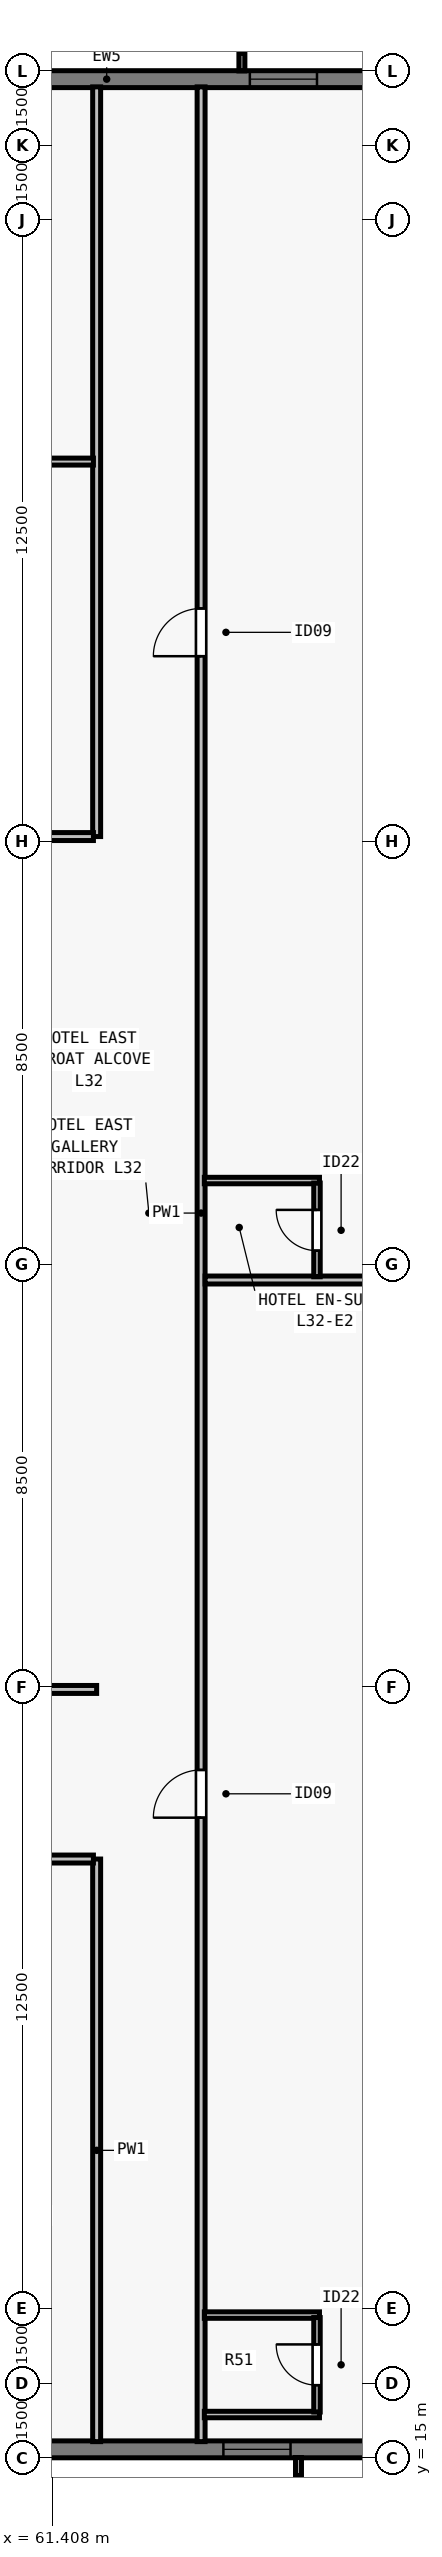
"""IFC4 building model, lengths in metres.
Left out: names, types, materials, properties, quantities, classifications, styles, units other than length and angle.
Written with IfcOpenShell. Run it as: python <this file> out.ifc"""

import sys

from ifc_helpers import new_model, si_unit, direction, frame, frame_2d, origin, place, context, subcontext, project, spatial, rectangle, extrude, element, fill, save


model = new_model("IFC4")
c1 = context("Model", 3, precision=1e-05, world=origin(), true_north=direction((0.0, 1.0)))
c2 = subcontext(c1, "Body", "Model", "MODEL_VIEW")
j1 = project(units=[si_unit("LENGTHUNIT", "METRE"), si_unit("PLANEANGLEUNIT", "RADIAN")], contexts=[c1])
p1 = place(None, origin())
s1 = spatial("IfcSite", under=j1, at=p1, CompositionType="ELEMENT")
p2 = place(p1, origin())
s2 = spatial("IfcBuilding", under=s1, at=p2, CompositionType="ELEMENT")
p3 = place(p2, frame((0.0, 0.0, 120.0)))
s3 = spatial("IfcBuildingStorey", under=s2, at=p3, CompositionType="ELEMENT", Elevation=120.0)
p4 = place(p3, frame((32.0, 62.83, 0.0), z_axis=(0.0, 0.0, 1.0), x_axis=(1.0, 0.0, 0.0)))
e1 = element("IfcWall", 1, at=p4, inside=s3, PredefinedType="SOLIDWALL", context=c2, shape_type="SweptSolid", body=[
    extrude(rectangle(XDim=39.682, YDim=0.34, at=frame_2d((19.841, 0.0))), origin(), (0.0, 0.0, 1.0), 3.28),
])
p5 = place(p4, frame((4.102, 0.0, 0.8)))
e2 = element("IfcOpeningElement", 2, at=p5, cuts=e1, PredefinedType="OPENING", context=c2, shape_type="SweptSolid", body=[
    extrude(rectangle(XDim=1.35, YDim=1.66, at=frame_2d((0.675, 0.83))), frame((0.0, 0.18, 0.0), z_axis=(0.0, -1.0, 0.0), x_axis=(1.0, 0.0, 0.0)), (0.0, 0.0, 1.0), 0.36),
])
p6 = place(p4, frame((8.755, 0.0, 0.8)))
e3 = element("IfcOpeningElement", 3, at=p6, cuts=e1, PredefinedType="OPENING", context=c2, shape_type="SweptSolid", body=[
    extrude(rectangle(XDim=1.75, YDim=1.66, at=frame_2d((0.875, 0.83))), frame((0.0, 0.18, 0.0), z_axis=(0.0, -1.0, 0.0), x_axis=(1.0, 0.0, 0.0)), (0.0, 0.0, 1.0), 0.36),
])
p7 = place(p4, frame((12.059, 0.0, 0.8)))
e4 = element("IfcOpeningElement", 4, at=p7, cuts=e1, PredefinedType="OPENING", context=c2, shape_type="SweptSolid", body=[
    extrude(rectangle(XDim=1.35, YDim=1.66, at=frame_2d((0.675, 0.83))), frame((0.0, 0.18, 0.0), z_axis=(0.0, -1.0, 0.0), x_axis=(1.0, 0.0, 0.0)), (0.0, 0.0, 1.0), 0.36),
])
p8 = place(p4, frame((16.262, 0.0, 0.8)))
e5 = element("IfcOpeningElement", 5, at=p8, cuts=e1, PredefinedType="OPENING", context=c2, shape_type="SweptSolid", body=[
    extrude(rectangle(XDim=1.75, YDim=1.66, at=frame_2d((0.875, 0.83))), frame((0.0, 0.18, 0.0), z_axis=(0.0, -1.0, 0.0), x_axis=(1.0, 0.0, 0.0)), (0.0, 0.0, 1.0), 0.36),
])
p9 = place(p4, frame((18.316, 0.0, 0.8)))
e6 = element("IfcOpeningElement", 6, at=p9, cuts=e1, PredefinedType="OPENING", context=c2, shape_type="SweptSolid", body=[
    extrude(rectangle(XDim=1.35, YDim=1.66, at=frame_2d((0.675, 0.83))), frame((0.0, 0.18, 0.0), z_axis=(0.0, -1.0, 0.0), x_axis=(1.0, 0.0, 0.0)), (0.0, 0.0, 1.0), 0.36),
])
p10 = place(p4, frame((22.07, 0.0, 0.8)))
e7 = element("IfcOpeningElement", 7, at=p10, cuts=e1, PredefinedType="OPENING", context=c2, shape_type="SweptSolid", body=[
    extrude(rectangle(XDim=1.75, YDim=1.66, at=frame_2d((0.875, 0.83))), frame((0.0, 0.18, 0.0), z_axis=(0.0, -1.0, 0.0), x_axis=(1.0, 0.0, 0.0)), (0.0, 0.0, 1.0), 0.36),
])
p11 = place(p4, frame((26.273, 0.0, 0.8)))
e8 = element("IfcOpeningElement", 8, at=p11, cuts=e1, PredefinedType="OPENING", context=c2, shape_type="SweptSolid", body=[
    extrude(rectangle(XDim=1.35, YDim=1.66, at=frame_2d((0.675, 0.83))), frame((0.0, 0.18, 0.0), z_axis=(0.0, -1.0, 0.0), x_axis=(1.0, 0.0, 0.0)), (0.0, 0.0, 1.0), 0.36),
])
p12 = place(p4, frame((33.38, 0.0, 0.8)))
e9 = element("IfcOpeningElement", 9, at=p12, cuts=e1, PredefinedType="OPENING", context=c2, shape_type="SweptSolid", body=[
    extrude(rectangle(XDim=1.35, YDim=1.66, at=frame_2d((0.675, 0.83))), frame((0.0, 0.18, 0.0), z_axis=(0.0, -1.0, 0.0), x_axis=(1.0, 0.0, 0.0)), (0.0, 0.0, 1.0), 0.36),
])
p13 = place(p3, frame((72.0, 15.17, 0.0), z_axis=(0.0, 0.0, 1.0), x_axis=(-1.0, 0.0, 0.0)))
e10 = element("IfcWall", 10, at=p13, inside=s3, PredefinedType="SOLIDWALL", context=c2, shape_type="SweptSolid", body=[
    extrude(rectangle(XDim=39.682, YDim=0.34, at=frame_2d((19.841, 0.0))), origin(), (0.0, 0.0, 1.0), 3.28),
])
p14 = place(p13, frame((5.802, 0.0, 0.8)))
e11 = element("IfcOpeningElement", 11, at=p14, cuts=e10, PredefinedType="OPENING", context=c2, shape_type="SweptSolid", body=[
    extrude(rectangle(XDim=1.35, YDim=1.66, at=frame_2d((0.675, 0.83))), frame((0.0, 0.18, 0.0), z_axis=(0.0, -1.0, 0.0), x_axis=(1.0, 0.0, 0.0)), (0.0, 0.0, 1.0), 0.36),
])
p15 = place(p13, frame((12.059, 0.0, 0.8)))
e12 = element("IfcOpeningElement", 12, at=p15, cuts=e10, PredefinedType="OPENING", context=c2, shape_type="SweptSolid", body=[
    extrude(rectangle(XDim=1.35, YDim=1.66, at=frame_2d((0.675, 0.83))), frame((0.0, 0.18, 0.0), z_axis=(0.0, -1.0, 0.0), x_axis=(1.0, 0.0, 0.0)), (0.0, 0.0, 1.0), 0.36),
])
p16 = place(p13, frame((19.166, 0.0, 0.8)))
e13 = element("IfcOpeningElement", 13, at=p16, cuts=e10, PredefinedType="OPENING", context=c2, shape_type="SweptSolid", body=[
    extrude(rectangle(XDim=1.35, YDim=1.66, at=frame_2d((0.675, 0.83))), frame((0.0, 0.18, 0.0), z_axis=(0.0, -1.0, 0.0), x_axis=(1.0, 0.0, 0.0)), (0.0, 0.0, 1.0), 0.36),
])
p17 = place(p13, frame((21.27, 0.0, 0.8)))
e14 = element("IfcOpeningElement", 14, at=p17, cuts=e10, PredefinedType="OPENING", context=c2, shape_type="SweptSolid", body=[
    extrude(rectangle(XDim=1.75, YDim=1.66, at=frame_2d((0.875, 0.83))), frame((0.0, 0.18, 0.0), z_axis=(0.0, -1.0, 0.0), x_axis=(1.0, 0.0, 0.0)), (0.0, 0.0, 1.0), 0.36),
])
p18 = place(p13, frame((27.523, 0.0, 0.8)))
e15 = element("IfcOpeningElement", 15, at=p18, cuts=e10, PredefinedType="OPENING", context=c2, shape_type="SweptSolid", body=[
    extrude(rectangle(XDim=1.35, YDim=1.66, at=frame_2d((0.675, 0.83))), frame((0.0, 0.18, 0.0), z_axis=(0.0, -1.0, 0.0), x_axis=(1.0, 0.0, 0.0)), (0.0, 0.0, 1.0), 0.36),
])
p19 = place(p13, frame((29.627, 0.0, 0.8)))
e16 = element("IfcOpeningElement", 16, at=p19, cuts=e10, PredefinedType="OPENING", context=c2, shape_type="SweptSolid", body=[
    extrude(rectangle(XDim=1.75, YDim=1.66, at=frame_2d((0.875, 0.83))), frame((0.0, 0.18, 0.0), z_axis=(0.0, -1.0, 0.0), x_axis=(1.0, 0.0, 0.0)), (0.0, 0.0, 1.0), 0.36),
])
p20 = place(p13, frame((25.43, 0.0, 0.8)))
e17 = element("IfcOpeningElement", 17, at=p20, cuts=e10, PredefinedType="OPENING", context=c2, shape_type="SweptSolid", body=[
    extrude(rectangle(XDim=0.9, YDim=1.66, at=frame_2d((0.45, 0.83))), frame((0.0, 0.18, 0.0), z_axis=(0.0, -1.0, 0.0), x_axis=(1.0, 0.0, 0.0)), (0.0, 0.0, 1.0), 0.36),
])
p21 = place(p13, frame((15.83, 0.0, 0.8)))
e18 = element("IfcOpeningElement", 18, at=p21, cuts=e10, PredefinedType="OPENING", context=c2, shape_type="SweptSolid", body=[
    extrude(rectangle(XDim=0.9, YDim=1.66, at=frame_2d((0.45, 0.83))), frame((0.0, 0.18, 0.0), z_axis=(0.0, -1.0, 0.0), x_axis=(1.0, 0.0, 0.0)), (0.0, 0.0, 1.0), 0.36),
])
p22 = place(p13, frame((34.39, 0.0, 0.8)))
e19 = element("IfcOpeningElement", 19, at=p22, cuts=e10, PredefinedType="OPENING", context=c2, shape_type="SweptSolid", body=[
    extrude(rectangle(XDim=0.9, YDim=1.66, at=frame_2d((0.45, 0.83))), frame((0.0, 0.18, 0.0), z_axis=(0.0, -1.0, 0.0), x_axis=(1.0, 0.0, 0.0)), (0.0, 0.0, 1.0), 0.36),
])
p23 = place(p3, frame((64.4, 15.325, 0.0), z_axis=(0.0, 0.0, 1.0), x_axis=(0.0, 1.0, 0.0)))
e20 = element("IfcWall", 20, at=p23, inside=s3, PredefinedType="PARTITIONING", context=c2, shape_type="SweptSolid", body=[
    extrude(rectangle(XDim=47.35, YDim=0.16, at=frame_2d((23.675, 0.0))), origin(), (0.0, 0.0, 1.0), 2.555),
])
p24 = place(p23, frame((12.547, 0.0, 0.0)))
e21 = element("IfcOpeningElement", 21, at=p24, cuts=e20, PredefinedType="OPENING", context=c2, shape_type="SweptSolid", body=[
    extrude(rectangle(XDim=0.96, YDim=2.15, at=frame_2d((0.48, 1.075))), frame((0.0, 0.09, 0.0), z_axis=(0.0, -1.0, 0.0), x_axis=(1.0, 0.0, 0.0)), (0.0, 0.0, 1.0), 0.18),
])
p25 = place(p23, frame((35.902, 0.0, 0.0)))
e22 = element("IfcOpeningElement", 22, at=p25, cuts=e20, PredefinedType="OPENING", context=c2, shape_type="SweptSolid", body=[
    extrude(rectangle(XDim=0.96, YDim=2.15, at=frame_2d((0.48, 1.075))), frame((0.0, 0.09, 0.0), z_axis=(0.0, -1.0, 0.0), x_axis=(1.0, 0.0, 0.0)), (0.0, 0.0, 1.0), 0.18),
])
p26 = place(p3, frame((62.3, 15.325, 0.0), z_axis=(0.0, 0.0, 1.0), x_axis=(0.0, 1.0, 0.0)))
e23 = element("IfcWall", 23, at=p26, inside=s3, PredefinedType="PARTITIONING", context=c2, shape_type="SweptSolid", body=[
    extrude(rectangle(XDim=11.715, YDim=0.16, at=frame_2d((5.857, 0.0))), origin(), (0.0, 0.0, 1.0), 3.28),
])
p27 = place(p3, frame((62.3, 47.6, 0.0), z_axis=(0.0, 0.0, 1.0), x_axis=(0.0, 1.0, 0.0)))
e24 = element("IfcWall", 24, at=p27, inside=s3, PredefinedType="PARTITIONING", context=c2, shape_type="SweptSolid", body=[
    extrude(rectangle(XDim=15.075, YDim=0.16, at=frame_2d((7.538, 0.0))), origin(), (0.0, 0.0, 1.0), 2.555),
])
p28 = place(p3, frame((60.765, 30.45, 0.0), z_axis=(0.0, 0.0, 1.0), x_axis=(1.0, 0.0, 0.0)))
e25 = element("IfcWall", 25, at=p28, inside=s3, PredefinedType="PARTITIONING", context=c2, shape_type="SweptSolid", body=[
    extrude(rectangle(XDim=1.535, YDim=0.16, at=frame_2d((0.768, 0.0))), origin(), (0.0, 0.0, 1.0), 3.28),
])
p29 = place(p3, frame((60.765, 47.6, 0.0), z_axis=(0.0, 0.0, 1.0), x_axis=(1.0, 0.0, 0.0)))
e26 = element("IfcWall", 26, at=p29, inside=s3, PredefinedType="PARTITIONING", context=c2, shape_type="SweptSolid", body=[
    extrude(rectangle(XDim=1.47, YDim=0.16, at=frame_2d((0.735, 0.0))), origin(), (0.0, 0.0, 1.0), 3.28),
])
p30 = place(p3, frame((40.165, 27.04, 0.0), z_axis=(0.0, 0.0, 1.0), x_axis=(1.0, 0.0, 0.0)))
e27 = element("IfcWall", 27, at=p30, inside=s3, PredefinedType="PARTITIONING", context=c2, shape_type="SweptSolid", body=[
    extrude(rectangle(XDim=22.07, YDim=0.16, at=frame_2d((11.035, 0.0))), origin(), (0.0, 0.0, 1.0), 3.28),
])
p31 = place(p30, frame((3.115, 0.0, 0.0)))
e28 = element("IfcOpeningElement", 28, at=p31, cuts=e27, PredefinedType="OPENING", context=c2, shape_type="SweptSolid", body=[
    extrude(rectangle(XDim=0.96, YDim=2.15, at=frame_2d((0.48, 1.075))), frame((0.0, 0.09, 0.0), z_axis=(0.0, -1.0, 0.0), x_axis=(1.0, 0.0, 0.0)), (0.0, 0.0, 1.0), 0.18),
])
p32 = place(p30, frame((5.372, 0.0, 0.0)))
e29 = element("IfcOpeningElement", 29, at=p32, cuts=e27, PredefinedType="OPENING", context=c2, shape_type="SweptSolid", body=[
    extrude(rectangle(XDim=0.96, YDim=2.15, at=frame_2d((0.48, 1.075))), frame((0.0, 0.09, 0.0), z_axis=(0.0, -1.0, 0.0), x_axis=(1.0, 0.0, 0.0)), (0.0, 0.0, 1.0), 0.18),
])
p33 = place(p30, frame((11.594, 0.0, 0.0)))
e30 = element("IfcOpeningElement", 30, at=p33, cuts=e27, PredefinedType="OPENING", context=c2, shape_type="SweptSolid", body=[
    extrude(rectangle(XDim=0.96, YDim=2.15, at=frame_2d((0.48, 1.075))), frame((0.0, 0.09, 0.0), z_axis=(0.0, -1.0, 0.0), x_axis=(1.0, 0.0, 0.0)), (0.0, 0.0, 1.0), 0.18),
])
p34 = place(p30, frame((14.188, 0.0, 0.0)))
e31 = element("IfcOpeningElement", 31, at=p34, cuts=e27, PredefinedType="OPENING", context=c2, shape_type="SweptSolid", body=[
    extrude(rectangle(XDim=0.96, YDim=2.15, at=frame_2d((0.48, 1.075))), frame((0.0, 0.09, 0.0), z_axis=(0.0, -1.0, 0.0), x_axis=(1.0, 0.0, 0.0)), (0.0, 0.0, 1.0), 0.18),
])
p35 = place(p30, frame((20.084, 0.0, 0.0)))
e32 = element("IfcOpeningElement", 32, at=p35, cuts=e27, PredefinedType="OPENING", context=c2, shape_type="SweptSolid", body=[
    extrude(rectangle(XDim=0.96, YDim=2.15, at=frame_2d((0.48, 1.075))), frame((0.0, 0.09, 0.0), z_axis=(0.0, -1.0, 0.0), x_axis=(1.0, 0.0, 0.0)), (0.0, 0.0, 1.0), 0.18),
])
p36 = place(p3, frame((40.165, 55.14, 0.0), z_axis=(0.0, 0.0, 1.0), x_axis=(1.0, 0.0, 0.0)))
e33 = element("IfcWall", 33, at=p36, inside=s3, PredefinedType="PARTITIONING", context=c2, shape_type="SweptSolid", body=[
    extrude(rectangle(XDim=22.07, YDim=0.14, at=frame_2d((11.035, 0.0))), origin(), (0.0, 0.0, 1.0), 3.28),
])
p37 = place(p36, frame((3.435, 0.0, 0.0)))
e34 = element("IfcOpeningElement", 34, at=p37, cuts=e33, PredefinedType="OPENING", context=c2, shape_type="SweptSolid", body=[
    extrude(rectangle(XDim=0.92, YDim=2.12, at=frame_2d((0.46, 1.06))), frame((0.0, 0.08, 0.0), z_axis=(0.0, -1.0, 0.0), x_axis=(1.0, 0.0, 0.0)), (0.0, 0.0, 1.0), 0.16),
])
p38 = place(p36, frame((14.435, 0.0, 0.0)))
e35 = element("IfcOpeningElement", 35, at=p38, cuts=e33, PredefinedType="OPENING", context=c2, shape_type="SweptSolid", body=[
    extrude(rectangle(XDim=0.92, YDim=2.12, at=frame_2d((0.46, 1.06))), frame((0.0, 0.08, 0.0), z_axis=(0.0, -1.0, 0.0), x_axis=(1.0, 0.0, 0.0)), (0.0, 0.0, 1.0), 0.16),
])
for number, where, z_axis, x_axis in (
    (36, (64.465, 15.87, 0.0), (0.0, 0.0, 1.0), (1.0, 0.0, 0.0)),
    (37, (64.465, 17.87, 0.0), (0.0, 0.0, 1.0), (1.0, 0.0, 0.0)),
):
    element("IfcWall", number, at=place(p3, frame(where, z_axis=z_axis, x_axis=x_axis)), inside=s3, PredefinedType="PLUMBINGWALL", context=c2, shape_type="SweptSolid", body=[
        extrude(rectangle(XDim=2.315, YDim=0.13, at=frame_2d((1.157, 0.0))), origin(), (0.0, 0.0, 1.0), 3.28),
    ])
p39 = place(p3, frame((66.73, 15.92, 0.0), z_axis=(0.0, 0.0, 1.0), x_axis=(0.0, 1.0, 0.0)))
e38 = element("IfcWall", 38, at=p39, inside=s3, PredefinedType="PLUMBINGWALL", context=c2, shape_type="SweptSolid", body=[
    extrude(rectangle(XDim=1.9, YDim=0.13, at=frame_2d((0.95, 0.0))), origin(), (0.0, 0.0, 1.0), 3.28),
])
p40 = place(p39, frame((0.54, 0.0, 0.0)))
e39 = element("IfcOpeningElement", 39, at=p40, cuts=e38, PredefinedType="OPENING", context=c2, shape_type="SweptSolid", body=[
    extrude(rectangle(XDim=0.82, YDim=2.1, at=frame_2d((0.41, 1.05))), frame((0.0, 0.075, 0.0), z_axis=(0.0, -1.0, 0.0), x_axis=(1.0, 0.0, 0.0)), (0.0, 0.0, 1.0), 0.15),
])
p41 = place(p3, frame((64.48, 38.683, 0.0), z_axis=(0.0, 0.0, 1.0), x_axis=(1.0, 0.0, 0.0)))
e40 = element("IfcWall", 40, at=p41, inside=s3, PredefinedType="PARTITIONING", context=c2, shape_type="SweptSolid", body=[
    extrude(rectangle(XDim=11.195, YDim=0.16, at=frame_2d((5.598, 0.0))), origin(), (0.0, 0.0, 1.0), 3.28),
])
p42 = place(p3, frame((64.465, 40.683, 0.0), z_axis=(0.0, 0.0, 1.0), x_axis=(1.0, 0.0, 0.0)))
e41 = element("IfcWall", 41, at=p42, inside=s3, PredefinedType="PLUMBINGWALL", context=c2, shape_type="SweptSolid", body=[
    extrude(rectangle(XDim=2.315, YDim=0.13, at=frame_2d((1.157, 0.0))), origin(), (0.0, 0.0, 1.0), 3.28),
])
p43 = place(p3, frame((66.73, 38.748, 0.0), z_axis=(0.0, 0.0, 1.0), x_axis=(0.0, 1.0, 0.0)))
e42 = element("IfcWall", 42, at=p43, inside=s3, PredefinedType="PLUMBINGWALL", context=c2, shape_type="SweptSolid", body=[
    extrude(rectangle(XDim=1.885, YDim=0.13, at=frame_2d((0.942, 0.0))), origin(), (0.0, 0.0, 1.0), 3.28),
])
p44 = place(p43, frame((0.525, 0.0, 0.0)))
e43 = element("IfcOpeningElement", 43, at=p44, cuts=e42, PredefinedType="OPENING", context=c2, shape_type="SweptSolid", body=[
    extrude(rectangle(XDim=0.82, YDim=2.1, at=frame_2d((0.41, 1.05))), frame((0.0, 0.075, 0.0), z_axis=(0.0, -1.0, 0.0), x_axis=(1.0, 0.0, 0.0)), (0.0, 0.0, 1.0), 0.15),
])
p45 = place(p12, origin())
e44 = element("IfcWindow", 44, at=p45, inside=s3, PartitioningType="SINGLE_PANEL", PredefinedType="WINDOW", context=c2, shape_type="SweptSolid", body=[
    extrude(rectangle(XDim=1.35, YDim=1.66, at=frame_2d((0.675, 0.83))), frame((0.0, -0.05, 0.0), z_axis=(0.0, -1.0, 0.0), x_axis=(1.0, 0.0, 0.0)), (0.0, 0.0, 1.0), 0.06),
])
fill(e9, e44)
p46 = place(p14, origin())
e45 = element("IfcWindow", 45, at=p46, inside=s3, PartitioningType="SINGLE_PANEL", PredefinedType="WINDOW", context=c2, shape_type="SweptSolid", body=[
    extrude(rectangle(XDim=1.35, YDim=1.66, at=frame_2d((0.675, 0.83))), frame((0.0, -0.05, 0.0), z_axis=(0.0, -1.0, 0.0), x_axis=(1.0, 0.0, 0.0)), (0.0, 0.0, 1.0), 0.06),
])
fill(e11, e45)
p47 = place(p40, origin())
e46 = element("IfcDoor", 46, at=p47, inside=s3, OperationType="SINGLE_SWING_RIGHT", PredefinedType="DOOR", context=c2, shape_type="SweptSolid", body=[
    extrude(rectangle(XDim=0.82, YDim=2.1, at=frame_2d((0.41, 1.05))), frame((0.0, 0.025, 0.0), z_axis=(0.0, -1.0, 0.0), x_axis=(1.0, 0.0, 0.0)), (0.0, 0.0, 1.0), 0.05),
])
fill(e39, e46)
p48 = place(p24, origin())
e47 = element("IfcDoor", 47, at=p48, inside=s3, OperationType="SINGLE_SWING_LEFT", PredefinedType="DOOR", context=c2, shape_type="SweptSolid", body=[
    extrude(rectangle(XDim=0.96, YDim=2.15, at=frame_2d((0.48, 1.075))), frame((0.0, 0.025, 0.0), z_axis=(0.0, -1.0, 0.0), x_axis=(1.0, 0.0, 0.0)), (0.0, 0.0, 1.0), 0.05),
])
fill(e21, e47)
p49 = place(p44, origin())
e48 = element("IfcDoor", 48, at=p49, inside=s3, OperationType="SINGLE_SWING_RIGHT", PredefinedType="DOOR", context=c2, shape_type="SweptSolid", body=[
    extrude(rectangle(XDim=0.82, YDim=2.1, at=frame_2d((0.41, 1.05))), frame((0.0, 0.025, 0.0), z_axis=(0.0, -1.0, 0.0), x_axis=(1.0, 0.0, 0.0)), (0.0, 0.0, 1.0), 0.05),
])
fill(e43, e48)
p50 = place(p25, origin())
e49 = element("IfcDoor", 49, at=p50, inside=s3, OperationType="SINGLE_SWING_LEFT", PredefinedType="DOOR", context=c2, shape_type="SweptSolid", body=[
    extrude(rectangle(XDim=0.96, YDim=2.15, at=frame_2d((0.48, 1.075))), frame((0.0, 0.025, 0.0), z_axis=(0.0, -1.0, 0.0), x_axis=(1.0, 0.0, 0.0)), (0.0, 0.0, 1.0), 0.05),
])
fill(e22, e49)
save(model, sys.argv[1])
